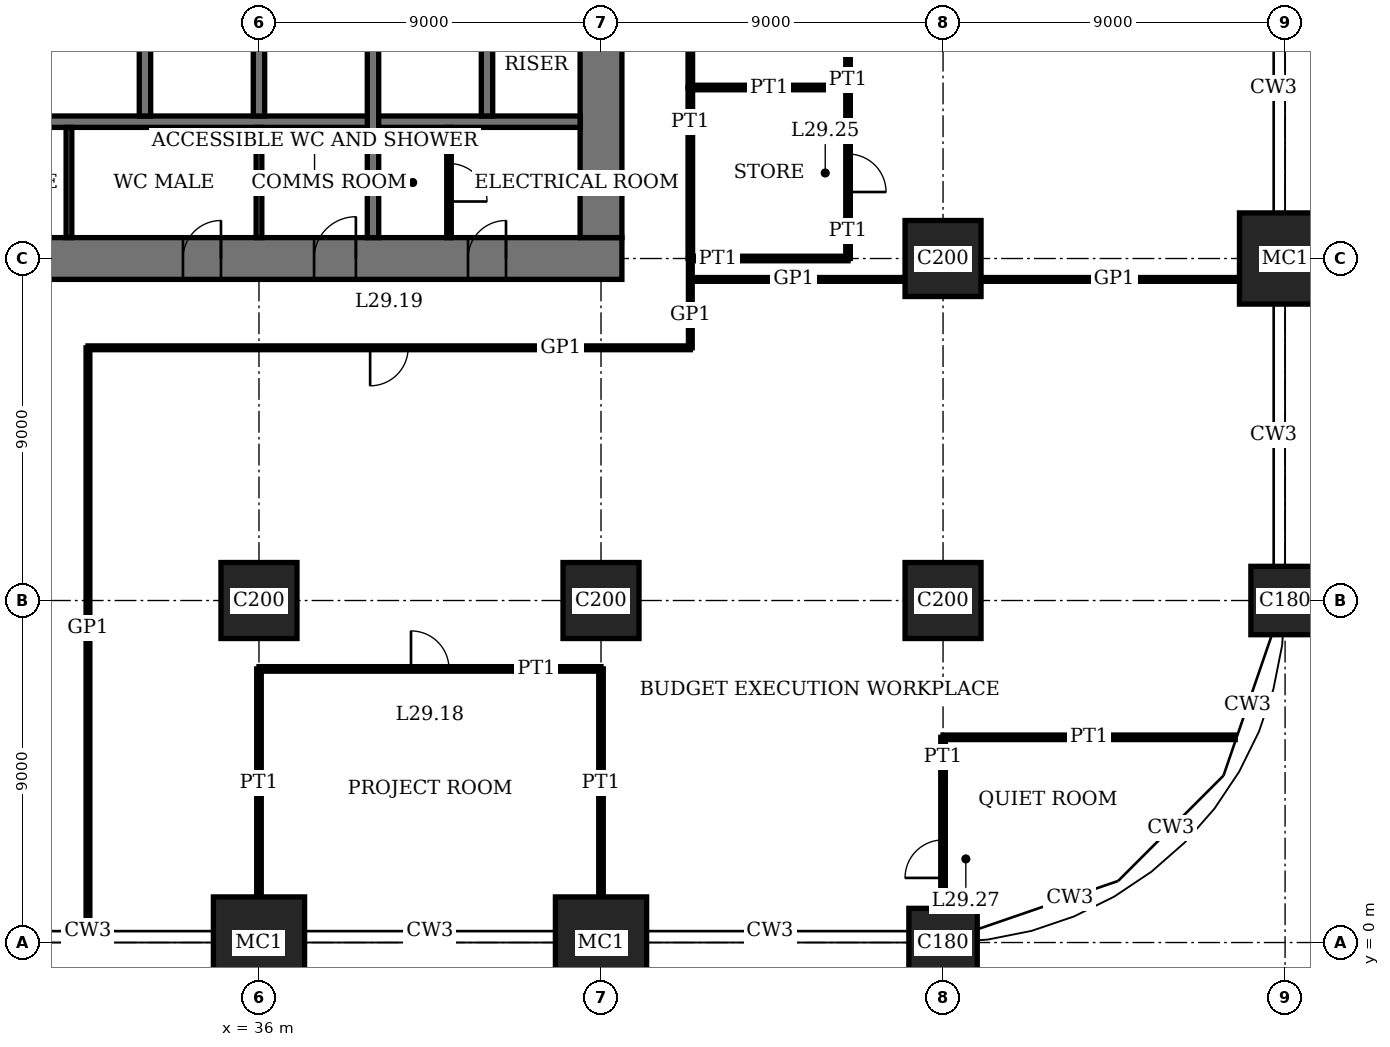
"""IFC4 building model, lengths in metres.
Left out: names, types, materials, properties, quantities, classifications, styles, units other than length and angle.
Written with IfcOpenShell. Run it as: python <this file> out.ifc"""

import sys

from ifc_helpers import new_model, si_unit, direction, frame, frame_2d, origin, origin_2d, place, context, subcontext, project, spatial, rectangle, extrude, element, fill, save


model = new_model("IFC4")
c1 = context("Model", 3, precision=1e-05, world=origin(), true_north=direction((0.0, 1.0)))
c2 = subcontext(c1, "Body", "Model", "MODEL_VIEW")
j1 = project(units=[si_unit("LENGTHUNIT", "METRE"), si_unit("PLANEANGLEUNIT", "RADIAN")], contexts=[c1])
p1 = place(None, origin())
s1 = spatial("IfcSite", under=j1, at=p1, CompositionType="ELEMENT")
p2 = place(p1, origin())
s2 = spatial("IfcBuilding", under=s1, at=p2, CompositionType="ELEMENT")
p3 = place(p2, frame((0.0, 0.0, 121.0)))
s3 = spatial("IfcBuildingStorey", under=s2, at=p3, CompositionType="ELEMENT", Elevation=121.0)
p4 = place(p3, frame((36.0, 0.0, 0.0), z_axis=(0.0, 0.0, 1.0), x_axis=(1.0, 0.0, 0.0)))
e1 = element("IfcColumn", 1, at=p4, inside=s3, PredefinedType="COLUMN", context=c2, shape_type="SweptSolid", body=[
    extrude(rectangle(XDim=2.4, YDim=2.4, at=origin_2d()), origin(), (0.0, 0.0, 1.0), 4.0),
])
p5 = place(p3, frame((36.0, 9.0, 0.0), z_axis=(0.0, 0.0, 1.0), x_axis=(1.0, 0.0, 0.0)))
e2 = element("IfcColumn", 2, at=p5, inside=s3, PredefinedType="COLUMN", context=c2, shape_type="SweptSolid", body=[
    extrude(rectangle(XDim=2.0, YDim=2.0, at=origin_2d()), origin(), (0.0, 0.0, 1.0), 4.0),
])
p6 = place(p3, frame((45.0, 0.0, 0.0), z_axis=(0.0, 0.0, 1.0), x_axis=(1.0, 0.0, 0.0)))
e3 = element("IfcColumn", 3, at=p6, inside=s3, PredefinedType="COLUMN", context=c2, shape_type="SweptSolid", body=[
    extrude(rectangle(XDim=2.4, YDim=2.4, at=origin_2d()), origin(), (0.0, 0.0, 1.0), 4.0),
])
p7 = place(p3, frame((45.0, 9.0, 0.0), z_axis=(0.0, 0.0, 1.0), x_axis=(1.0, 0.0, 0.0)))
e4 = element("IfcColumn", 4, at=p7, inside=s3, PredefinedType="COLUMN", context=c2, shape_type="SweptSolid", body=[
    extrude(rectangle(XDim=2.0, YDim=2.0, at=origin_2d()), origin(), (0.0, 0.0, 1.0), 4.0),
])
p8 = place(p3, frame((54.0, 0.0, 0.0), z_axis=(0.0, 0.0, 1.0), x_axis=(1.0, 0.0, 0.0)))
e5 = element("IfcColumn", 5, at=p8, inside=s3, PredefinedType="COLUMN", context=c2, shape_type="SweptSolid", body=[
    extrude(rectangle(XDim=1.8, YDim=1.8, at=origin_2d()), origin(), (0.0, 0.0, 1.0), 4.0),
])
for number, where, z_axis, x_axis in (
    (6, (54.0, 9.0, 0.0), (0.0, 0.0, 1.0), (1.0, 0.0, 0.0)),
    (7, (54.0, 18.0, 0.0), (0.0, 0.0, 1.0), (1.0, 0.0, 0.0)),
):
    element("IfcColumn", number, at=place(p3, frame(where, z_axis=z_axis, x_axis=x_axis)), inside=s3, PredefinedType="COLUMN", context=c2, shape_type="SweptSolid", body=[
        extrude(rectangle(XDim=2.0, YDim=2.0, at=origin_2d()), origin(), (0.0, 0.0, 1.0), 4.0),
    ])
p9 = place(p3, frame((63.0, 9.0, 0.0), z_axis=(0.0, 0.0, 1.0), x_axis=(1.0, 0.0, 0.0)))
e8 = element("IfcColumn", 8, at=p9, inside=s3, PredefinedType="COLUMN", context=c2, shape_type="SweptSolid", body=[
    extrude(rectangle(XDim=1.8, YDim=1.8, at=origin_2d()), origin(), (0.0, 0.0, 1.0), 4.0),
])
p10 = place(p3, frame((63.0, 18.0, 0.0), z_axis=(0.0, 0.0, 1.0), x_axis=(1.0, 0.0, 0.0)))
e9 = element("IfcColumn", 9, at=p10, inside=s3, PredefinedType="COLUMN", context=c2, shape_type="SweptSolid", body=[
    extrude(rectangle(XDim=2.4, YDim=2.4, at=origin_2d()), origin(), (0.0, 0.0, 1.0), 4.0),
])
p11 = place(p3, frame((17.45, 18.0, 0.0), z_axis=(0.0, 0.0, 1.0), x_axis=(1.0, 0.0, 0.0)))
e10 = element("IfcWall", 10, at=p11, inside=s3, PredefinedType="SHEAR", context=c2, shape_type="SweptSolid", body=[
    extrude(rectangle(XDim=28.1, YDim=1.1, at=frame_2d((14.05, 0.0))), origin(), (0.0, 0.0, 1.0), 4.0),
])
p12 = place(p11, frame((11.55, 0.0, 0.0)))
e11 = element("IfcOpeningElement", 11, at=p12, cuts=e10, PredefinedType="OPENING", context=c2, shape_type="SweptSolid", body=[
    extrude(rectangle(XDim=1.0, YDim=2.4, at=frame_2d((0.5, 1.2))), frame((0.0, 0.56, 0.0), z_axis=(0.0, -1.0, 0.0), x_axis=(1.0, 0.0, 0.0)), (0.0, 0.0, 1.0), 1.12),
])
p13 = place(p11, frame((16.55, 0.0, 0.0)))
e12 = element("IfcOpeningElement", 12, at=p13, cuts=e10, PredefinedType="OPENING", context=c2, shape_type="SweptSolid", body=[
    extrude(rectangle(XDim=1.0, YDim=2.4, at=frame_2d((0.5, 1.2))), frame((0.0, 0.56, 0.0), z_axis=(0.0, -1.0, 0.0), x_axis=(1.0, 0.0, 0.0)), (0.0, 0.0, 1.0), 1.12),
])
p14 = place(p11, frame((20.0, 0.0, 0.0)))
e13 = element("IfcOpeningElement", 13, at=p14, cuts=e10, PredefinedType="OPENING", context=c2, shape_type="SweptSolid", body=[
    extrude(rectangle(XDim=1.1, YDim=2.4, at=frame_2d((0.55, 1.2))), frame((0.0, 0.56, 0.0), z_axis=(0.0, -1.0, 0.0), x_axis=(1.0, 0.0, 0.0)), (0.0, 0.0, 1.0), 1.12),
])
p15 = place(p11, frame((24.05, 0.0, 0.0)))
e14 = element("IfcOpeningElement", 14, at=p15, cuts=e10, PredefinedType="OPENING", context=c2, shape_type="SweptSolid", body=[
    extrude(rectangle(XDim=1.0, YDim=2.4, at=frame_2d((0.5, 1.2))), frame((0.0, 0.56, 0.0), z_axis=(0.0, -1.0, 0.0), x_axis=(1.0, 0.0, 0.0)), (0.0, 0.0, 1.0), 1.12),
])
p16 = place(p3, frame((45.0, 18.55, 0.0), z_axis=(0.0, 0.0, 1.0), x_axis=(0.0, 1.0, 0.0)))
e15 = element("IfcWall", 15, at=p16, inside=s3, PredefinedType="SHEAR", context=c2, shape_type="SweptSolid", body=[
    extrude(rectangle(XDim=16.9, YDim=1.1, at=frame_2d((8.45, 0.0))), origin(), (0.0, 0.0, 1.0), 4.0),
])
p17 = place(p16, frame((8.45, 0.0, 0.0)))
e16 = element("IfcOpeningElement", 16, at=p17, cuts=e15, PredefinedType="OPENING", context=c2, shape_type="SweptSolid", body=[
    extrude(rectangle(XDim=1.8, YDim=2.4, at=frame_2d((0.9, 1.2))), frame((0.0, 0.56, 0.0), z_axis=(0.0, -1.0, 0.0), x_axis=(1.0, 0.0, 0.0)), (0.0, 0.0, 1.0), 1.12),
])
p18 = place(p3, frame((27.15, 21.6, 0.0), z_axis=(0.0, 0.0, 1.0), x_axis=(1.0, 0.0, 0.0)))
e17 = element("IfcWall", 17, at=p18, inside=s3, PredefinedType="SHEAR", context=c2, shape_type="SweptSolid", body=[
    extrude(rectangle(XDim=17.3, YDim=0.3, at=frame_2d((8.65, 0.0))), origin(), (0.0, 0.0, 1.0), 4.0),
])
for number, where, z_axis, x_axis in (
    (18, (33.0, 21.75, 0.0), (0.0, 0.0, 1.0), (0.0, 1.0, 0.0)),
    (19, (36.0, 21.75, 0.0), (0.0, 0.0, 1.0), (0.0, 1.0, 0.0)),
):
    element("IfcWall", number, at=place(p3, frame(where, z_axis=z_axis, x_axis=x_axis)), inside=s3, PredefinedType="SHEAR", context=c2, shape_type="SweptSolid", body=[
        extrude(rectangle(XDim=2.7, YDim=0.3, at=frame_2d((1.35, 0.0))), origin(), (0.0, 0.0, 1.0), 4.0),
    ])
p19 = place(p3, frame((39.0, 18.55, 0.0), z_axis=(0.0, 0.0, 1.0), x_axis=(0.0, 1.0, 0.0)))
e20 = element("IfcWall", 20, at=p19, inside=s3, PredefinedType="SHEAR", context=c2, shape_type="SweptSolid", body=[
    extrude(rectangle(XDim=5.9, YDim=0.3, at=frame_2d((2.95, 0.0))), origin(), (0.0, 0.0, 1.0), 4.0),
])
p20 = place(p3, frame((42.0, 21.75, 0.0), z_axis=(0.0, 0.0, 1.0), x_axis=(0.0, 1.0, 0.0)))
e21 = element("IfcWall", 21, at=p20, inside=s3, PredefinedType="SHEAR", context=c2, shape_type="SweptSolid", body=[
    extrude(rectangle(XDim=2.7, YDim=0.3, at=frame_2d((1.35, 0.0))), origin(), (0.0, 0.0, 1.0), 4.0),
])
p21 = place(p3, frame((54.0, 5.4, 0.0), z_axis=(0.0, 0.0, 1.0), x_axis=(1.0, 0.0, 0.0)))
e22 = element("IfcWall", 22, at=p21, inside=s3, PredefinedType="PARTITIONING", context=c2, shape_type="SweptSolid", body=[
    extrude(rectangle(XDim=7.688, YDim=0.12, at=frame_2d((3.844, 0.0))), origin(), (0.0, 0.0, 1.0), 3.75),
])
p22 = place(p3, frame((36.0, 7.2, 0.0), z_axis=(0.0, 0.0, 1.0), x_axis=(1.0, 0.0, 0.0)))
e23 = element("IfcWall", 23, at=p22, inside=s3, PredefinedType="PARTITIONING", context=c2, shape_type="SweptSolid", body=[
    extrude(rectangle(XDim=9.0, YDim=0.12, at=frame_2d((4.5, 0.0))), origin(), (0.0, 0.0, 1.0), 3.75),
])
p23 = place(p22, frame((4.0, 0.0, 0.0)))
e24 = element("IfcOpeningElement", 24, at=p23, cuts=e23, PredefinedType="OPENING", context=c2, shape_type="SweptSolid", body=[
    extrude(rectangle(XDim=1.0, YDim=2.4, at=frame_2d((0.5, 1.2))), frame((0.0, 0.07, 0.0), z_axis=(0.0, -1.0, 0.0), x_axis=(1.0, 0.0, 0.0)), (0.0, 0.0, 1.0), 0.14),
])
p24 = place(p3, frame((31.5, 15.65, 0.0), z_axis=(0.0, 0.0, 1.0), x_axis=(1.0, 0.0, 0.0)))
e25 = element("IfcWall", 25, at=p24, inside=s3, PredefinedType="PARTITIONING", context=c2, shape_type="SweptSolid", body=[
    extrude(rectangle(XDim=15.85, YDim=0.1, at=frame_2d((7.925, 0.0))), origin(), (0.0, 0.0, 1.0), 3.75),
])
p25 = place(p24, frame((7.425, 0.0, 0.0)))
e26 = element("IfcOpeningElement", 26, at=p25, cuts=e25, PredefinedType="OPENING", context=c2, shape_type="SweptSolid", body=[
    extrude(rectangle(XDim=1.0, YDim=2.4, at=frame_2d((0.5, 1.2))), frame((0.0, 0.06, 0.0), z_axis=(0.0, -1.0, 0.0), x_axis=(1.0, 0.0, 0.0)), (0.0, 0.0, 1.0), 0.12),
])
p26 = place(p3, frame((47.35, 17.45, 0.0), z_axis=(0.0, 0.0, 1.0), x_axis=(1.0, 0.0, 0.0)))
e27 = element("IfcWall", 27, at=p26, inside=s3, PredefinedType="PARTITIONING", context=c2, shape_type="SweptSolid", body=[
    extrude(rectangle(XDim=5.65, YDim=0.1, at=frame_2d((2.825, 0.0))), origin(), (0.0, 0.0, 1.0), 3.75),
])
p27 = place(p3, frame((55.0, 17.45, 0.0), z_axis=(0.0, 0.0, 1.0), x_axis=(1.0, 0.0, 0.0)))
e28 = element("IfcWall", 28, at=p27, inside=s3, PredefinedType="PARTITIONING", context=c2, shape_type="SweptSolid", body=[
    extrude(rectangle(XDim=6.8, YDim=0.1, at=frame_2d((3.4, 0.0))), origin(), (0.0, 0.0, 1.0), 3.75),
])
p28 = place(p3, frame((47.35, 18.0, 0.0), z_axis=(0.0, 0.0, 1.0), x_axis=(1.0, 0.0, 0.0)))
e29 = element("IfcWall", 29, at=p28, inside=s3, PredefinedType="PARTITIONING", context=c2, shape_type="SweptSolid", body=[
    extrude(rectangle(XDim=4.15, YDim=0.12, at=frame_2d((2.075, 0.0))), origin(), (0.0, 0.0, 1.0), 3.05),
])
p29 = place(p3, frame((47.35, 22.5, 0.0), z_axis=(0.0, 0.0, 1.0), x_axis=(1.0, 0.0, 0.0)))
e30 = element("IfcWall", 30, at=p29, inside=s3, PredefinedType="PARTITIONING", context=c2, shape_type="SweptSolid", body=[
    extrude(rectangle(XDim=4.15, YDim=0.12, at=frame_2d((2.075, 0.0))), origin(), (0.0, 0.0, 1.0), 3.1),
])
p30 = place(p3, frame((31.5, 0.31, 0.0), z_axis=(0.0, 0.0, 1.0), x_axis=(0.0, 1.0, 0.0)))
e31 = element("IfcWall", 31, at=p30, inside=s3, PredefinedType="PARTITIONING", context=c2, shape_type="SweptSolid", body=[
    extrude(rectangle(XDim=15.34, YDim=0.1, at=frame_2d((7.67, 0.0))), origin(), (0.0, 0.0, 1.0), 3.75),
])
for number, where, z_axis, x_axis in (
    (32, (36.0, 1.2, 0.0), (0.0, 0.0, 1.0), (0.0, 1.0, 0.0)),
    (33, (45.0, 1.2, 0.0), (0.0, 0.0, 1.0), (0.0, 1.0, 0.0)),
):
    element("IfcWall", number, at=place(p3, frame(where, z_axis=z_axis, x_axis=x_axis)), inside=s3, PredefinedType="PARTITIONING", context=c2, shape_type="SweptSolid", body=[
        extrude(rectangle(XDim=6.0, YDim=0.12, at=frame_2d((3.0, 0.0))), origin(), (0.0, 0.0, 1.0), 3.05),
    ])
for number, where, z_axis, x_axis in (
    (34, (47.35, 18.0, 0.0), (0.0, 0.0, 1.0), (0.0, 1.0, 0.0)),
    (35, (47.35, 22.5, 0.0), (0.0, 0.0, 1.0), (0.0, 1.0, 0.0)),
):
    element("IfcWall", number, at=place(p3, frame(where, z_axis=z_axis, x_axis=x_axis)), inside=s3, PredefinedType="PARTITIONING", context=c2, shape_type="SweptSolid", body=[
        extrude(rectangle(XDim=4.5, YDim=0.12, at=frame_2d((2.25, 0.0))), origin(), (0.0, 0.0, 1.0), 3.75),
    ])
p31 = place(p3, frame((47.35, 15.65, 0.0), z_axis=(0.0, 0.0, 1.0), x_axis=(0.0, 1.0, 0.0)))
e36 = element("IfcWall", 36, at=p31, inside=s3, PredefinedType="PARTITIONING", context=c2, shape_type="SweptSolid", body=[
    extrude(rectangle(XDim=2.35, YDim=0.1, at=frame_2d((1.175, 0.0))), origin(), (0.0, 0.0, 1.0), 3.75),
])
p32 = place(p3, frame((51.5, 18.0, 0.0), z_axis=(0.0, 0.0, 1.0), x_axis=(0.0, 1.0, 0.0)))
e37 = element("IfcWall", 37, at=p32, inside=s3, PredefinedType="PARTITIONING", context=c2, shape_type="SweptSolid", body=[
    extrude(rectangle(XDim=4.5, YDim=0.12, at=frame_2d((2.25, 0.0))), origin(), (0.0, 0.0, 1.0), 3.75),
])
p33 = place(p32, frame((1.75, 0.0, 0.0)))
e38 = element("IfcOpeningElement", 38, at=p33, cuts=e37, PredefinedType="OPENING", context=c2, shape_type="SweptSolid", body=[
    extrude(rectangle(XDim=1.0, YDim=2.4, at=frame_2d((0.5, 1.2))), frame((0.0, 0.07, 0.0), z_axis=(0.0, -1.0, 0.0), x_axis=(1.0, 0.0, 0.0)), (0.0, 0.0, 1.0), 0.14),
])
p34 = place(p3, frame((51.5, 22.5, 0.0), z_axis=(0.0, 0.0, 1.0), x_axis=(0.0, 1.0, 0.0)))
e39 = element("IfcWall", 39, at=p34, inside=s3, PredefinedType="PARTITIONING", context=c2, shape_type="SweptSolid", body=[
    extrude(rectangle(XDim=4.5, YDim=0.12, at=frame_2d((2.25, 0.0))), origin(), (0.0, 0.0, 1.0), 3.75),
])
p35 = place(p34, frame((1.75, 0.0, 0.0)))
e40 = element("IfcOpeningElement", 40, at=p35, cuts=e39, PredefinedType="OPENING", context=c2, shape_type="SweptSolid", body=[
    extrude(rectangle(XDim=1.0, YDim=2.4, at=frame_2d((0.5, 1.2))), frame((0.0, 0.07, 0.0), z_axis=(0.0, -1.0, 0.0), x_axis=(1.0, 0.0, 0.0)), (0.0, 0.0, 1.0), 0.14),
])
p36 = place(p3, frame((54.0, 0.9, 0.0), z_axis=(0.0, 0.0, 1.0), x_axis=(0.0, 1.0, 0.0)))
e41 = element("IfcWall", 41, at=p36, inside=s3, PredefinedType="PARTITIONING", context=c2, shape_type="SweptSolid", body=[
    extrude(rectangle(XDim=4.5, YDim=0.12, at=frame_2d((2.25, 0.0))), origin(), (0.0, 0.0, 1.0), 3.05),
])
p37 = place(p36, frame((0.8, 0.0, 0.0)))
e42 = element("IfcOpeningElement", 42, at=p37, cuts=e41, PredefinedType="OPENING", context=c2, shape_type="SweptSolid", body=[
    extrude(rectangle(XDim=1.0, YDim=2.4, at=frame_2d((0.5, 1.2))), frame((0.0, 0.07, 0.0), z_axis=(0.0, -1.0, 0.0), x_axis=(1.0, 0.0, 0.0)), (0.0, 0.0, 1.0), 0.14),
])
for number, where, z_axis, x_axis in (
    (43, (31.0, 18.55, 0.0), (0.0, 0.0, 1.0), (0.0, 1.0, 0.0)),
    (44, (36.0, 18.55, 0.0), (0.0, 0.0, 1.0), (0.0, 1.0, 0.0)),
):
    element("IfcWall", number, at=place(p3, frame(where, z_axis=z_axis, x_axis=x_axis)), inside=s3, PredefinedType="PARTITIONING", context=c2, shape_type="SweptSolid", body=[
        extrude(rectangle(XDim=2.9, YDim=0.15, at=frame_2d((1.45, 0.0))), origin(), (0.0, 0.0, 1.0), 3.75),
    ])
p38 = place(p3, frame((41.0, 18.55, 0.0), z_axis=(0.0, 0.0, 1.0), x_axis=(0.0, 1.0, 0.0)))
e45 = element("IfcWall", 45, at=p38, inside=s3, PredefinedType="PARTITIONING", context=c2, shape_type="SweptSolid", body=[
    extrude(rectangle(XDim=2.9, YDim=0.12, at=frame_2d((1.45, 0.0))), origin(), (0.0, 0.0, 1.0), 3.75),
])
p39 = place(p38, frame((0.95, 0.0, 0.0)))
e46 = element("IfcOpeningElement", 46, at=p39, cuts=e45, PredefinedType="OPENING", context=c2, shape_type="SweptSolid", body=[
    extrude(rectangle(XDim=1.0, YDim=2.4, at=frame_2d((0.5, 1.2))), frame((0.0, 0.07, 0.0), z_axis=(0.0, -1.0, 0.0), x_axis=(1.0, 0.0, 0.0)), (0.0, 0.0, 1.0), 0.14),
])
p40 = place(p13, origin())
e47 = element("IfcDoor", 47, at=p40, inside=s3, OperationType="SINGLE_SWING_LEFT", PredefinedType="DOOR", context=c2, shape_type="SweptSolid", body=[
    extrude(rectangle(XDim=1.0, YDim=2.4, at=frame_2d((0.5, 1.2))), frame((0.0, 0.025, 0.0), z_axis=(0.0, -1.0, 0.0), x_axis=(1.0, 0.0, 0.0)), (0.0, 0.0, 1.0), 0.05),
    extrude(rectangle(XDim=0.04, YDim=2.4, at=frame_2d((0.02, 1.2))), frame((0.0, 0.4, 0.0), z_axis=(0.0, -1.0, 0.0), x_axis=(1.0, 0.0, 0.0)), (0.0, 0.0, 1.0), 0.8),
    extrude(rectangle(XDim=0.04, YDim=2.4, at=frame_2d((0.98, 1.2))), frame((0.0, 0.4, 0.0), z_axis=(0.0, -1.0, 0.0), x_axis=(1.0, 0.0, 0.0)), (0.0, 0.0, 1.0), 0.8),
    extrude(rectangle(XDim=1.0, YDim=0.04, at=frame_2d((0.5, 2.38))), frame((0.0, 0.4, 0.0), z_axis=(0.0, -1.0, 0.0), x_axis=(1.0, 0.0, 0.0)), (0.0, 0.0, 1.0), 0.8),
])
fill(e12, e47)
p41 = place(p14, origin())
e48 = element("IfcDoor", 48, at=p41, inside=s3, OperationType="SINGLE_SWING_LEFT", PredefinedType="DOOR", context=c2, shape_type="SweptSolid", body=[
    extrude(rectangle(XDim=1.1, YDim=2.4, at=frame_2d((0.55, 1.2))), frame((0.0, 0.025, 0.0), z_axis=(0.0, -1.0, 0.0), x_axis=(1.0, 0.0, 0.0)), (0.0, 0.0, 1.0), 0.05),
    extrude(rectangle(XDim=0.04, YDim=2.4, at=frame_2d((0.02, 1.2))), frame((0.0, 0.44, 0.0), z_axis=(0.0, -1.0, 0.0), x_axis=(1.0, 0.0, 0.0)), (0.0, 0.0, 1.0), 0.88),
    extrude(rectangle(XDim=0.04, YDim=2.4, at=frame_2d((1.08, 1.2))), frame((0.0, 0.44, 0.0), z_axis=(0.0, -1.0, 0.0), x_axis=(1.0, 0.0, 0.0)), (0.0, 0.0, 1.0), 0.88),
    extrude(rectangle(XDim=1.1, YDim=0.04, at=frame_2d((0.55, 2.38))), frame((0.0, 0.44, 0.0), z_axis=(0.0, -1.0, 0.0), x_axis=(1.0, 0.0, 0.0)), (0.0, 0.0, 1.0), 0.88),
])
fill(e13, e48)
p42 = place(p15, origin())
e49 = element("IfcDoor", 49, at=p42, inside=s3, OperationType="SINGLE_SWING_LEFT", PredefinedType="DOOR", context=c2, shape_type="SweptSolid", body=[
    extrude(rectangle(XDim=1.0, YDim=2.4, at=frame_2d((0.5, 1.2))), frame((0.0, 0.025, 0.0), z_axis=(0.0, -1.0, 0.0), x_axis=(1.0, 0.0, 0.0)), (0.0, 0.0, 1.0), 0.05),
    extrude(rectangle(XDim=0.04, YDim=2.4, at=frame_2d((0.02, 1.2))), frame((0.0, 0.4, 0.0), z_axis=(0.0, -1.0, 0.0), x_axis=(1.0, 0.0, 0.0)), (0.0, 0.0, 1.0), 0.8),
    extrude(rectangle(XDim=0.04, YDim=2.4, at=frame_2d((0.98, 1.2))), frame((0.0, 0.4, 0.0), z_axis=(0.0, -1.0, 0.0), x_axis=(1.0, 0.0, 0.0)), (0.0, 0.0, 1.0), 0.8),
    extrude(rectangle(XDim=1.0, YDim=0.04, at=frame_2d((0.5, 2.38))), frame((0.0, 0.4, 0.0), z_axis=(0.0, -1.0, 0.0), x_axis=(1.0, 0.0, 0.0)), (0.0, 0.0, 1.0), 0.8),
])
fill(e14, e49)
p43 = place(p23, origin())
e50 = element("IfcDoor", 50, at=p43, inside=s3, OperationType="SINGLE_SWING_RIGHT", PredefinedType="DOOR", context=c2, shape_type="SweptSolid", body=[
    extrude(rectangle(XDim=1.0, YDim=2.4, at=frame_2d((0.5, 1.2))), frame((0.0, 0.025, 0.0), z_axis=(0.0, -1.0, 0.0), x_axis=(1.0, 0.0, 0.0)), (0.0, 0.0, 1.0), 0.05),
])
fill(e24, e50)
p44 = place(p25, origin())
e51 = element("IfcDoor", 51, at=p44, inside=s3, OperationType="SINGLE_SWING_LEFT", PredefinedType="DOOR", context=c2, shape_type="SweptSolid", body=[
    extrude(rectangle(XDim=1.0, YDim=2.4, at=frame_2d((0.5, 1.2))), frame((0.0, 0.02, 0.0), z_axis=(0.0, -1.0, 0.0), x_axis=(1.0, 0.0, 0.0)), (0.0, 0.0, 1.0), 0.04),
])
fill(e26, e51)
p45 = place(p33, origin())
e52 = element("IfcDoor", 52, at=p45, inside=s3, OperationType="SINGLE_SWING_LEFT", PredefinedType="DOOR", context=c2, shape_type="SweptSolid", body=[
    extrude(rectangle(XDim=1.0, YDim=2.4, at=frame_2d((0.5, 1.2))), frame((0.0, 0.025, 0.0), z_axis=(0.0, -1.0, 0.0), x_axis=(1.0, 0.0, 0.0)), (0.0, 0.0, 1.0), 0.05),
])
fill(e38, e52)
p46 = place(p37, origin())
e53 = element("IfcDoor", 53, at=p46, inside=s3, OperationType="SINGLE_SWING_RIGHT", PredefinedType="DOOR", context=c2, shape_type="SweptSolid", body=[
    extrude(rectangle(XDim=1.0, YDim=2.4, at=frame_2d((0.5, 1.2))), frame((0.0, 0.025, 0.0), z_axis=(0.0, -1.0, 0.0), x_axis=(1.0, 0.0, 0.0)), (0.0, 0.0, 1.0), 0.05),
])
fill(e42, e53)
p47 = place(p39, origin())
e54 = element("IfcDoor", 54, at=p47, inside=s3, OperationType="SINGLE_SWING_LEFT", PredefinedType="DOOR", context=c2, shape_type="SweptSolid", body=[
    extrude(rectangle(XDim=1.0, YDim=2.4, at=frame_2d((0.5, 1.2))), frame((0.0, 0.03, 0.0), z_axis=(0.0, -1.0, 0.0), x_axis=(1.0, 0.0, 0.0)), (0.0, 0.0, 1.0), 0.06),
])
fill(e46, e54)
save(model, sys.argv[1])
